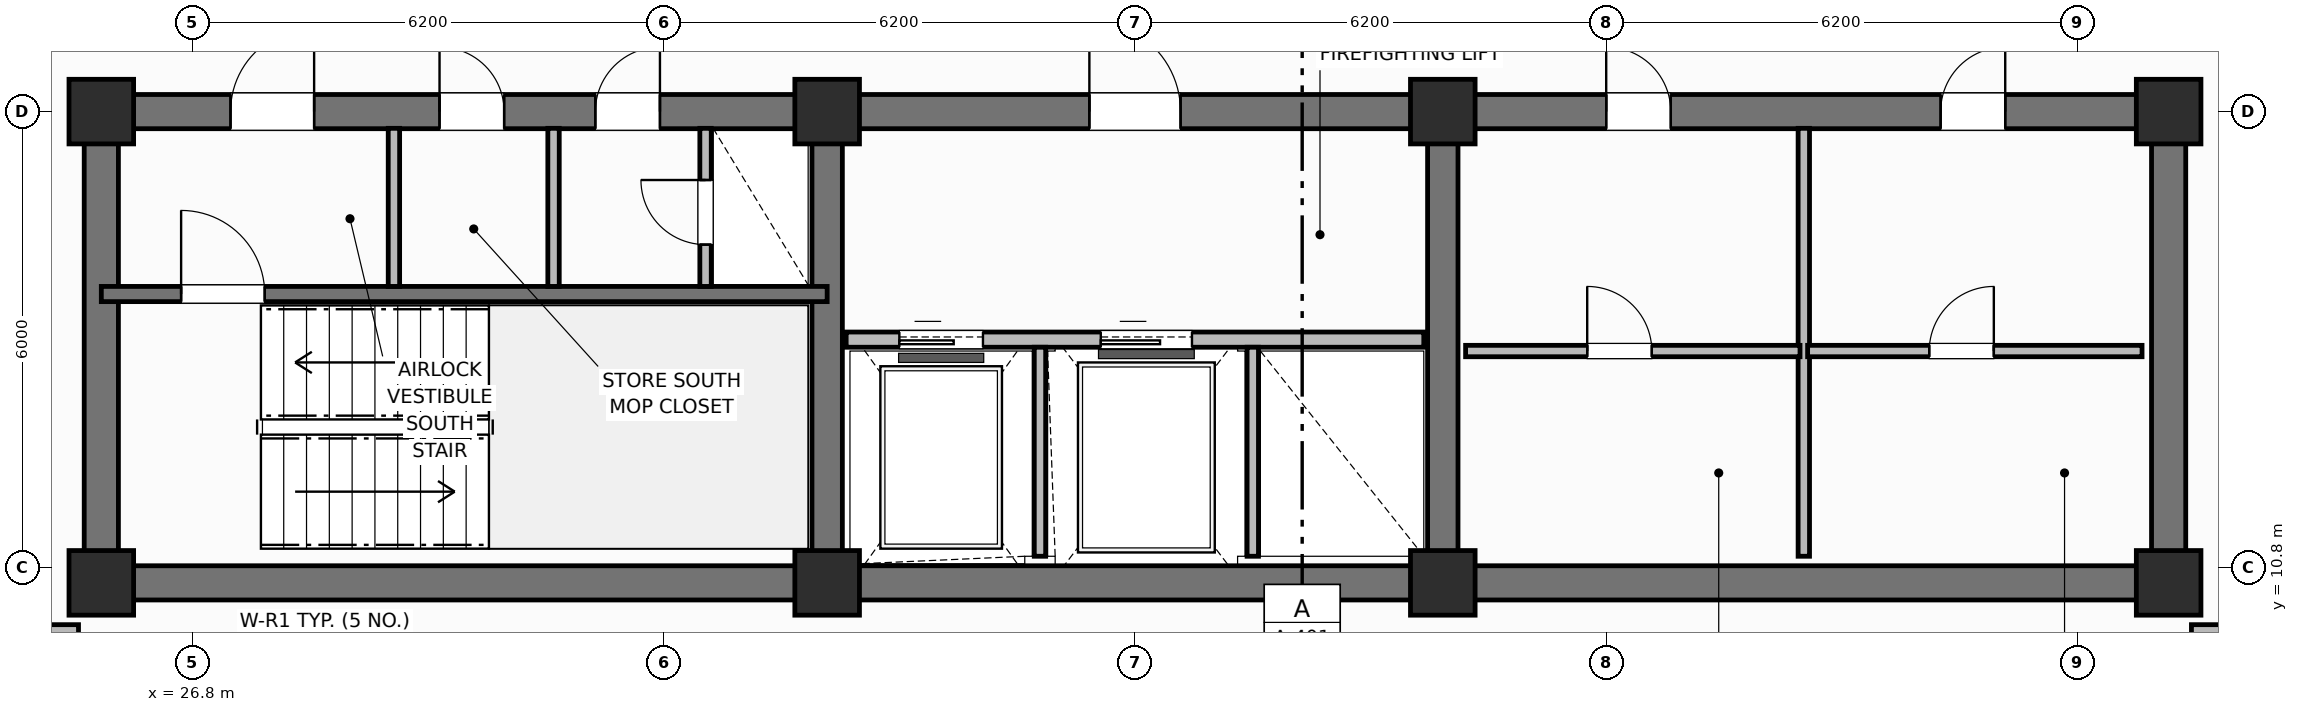
"""IFC4 building model, lengths in metres.
Left out: names, types, materials, properties, quantities, classifications, styles, units other than length and angle.
Written with IfcOpenShell. Run it as: python <this file> out.ifc"""

import sys

from ifc_helpers import new_model, si_unit, direction, frame, frame_2d, origin, origin_2d, place, context, subcontext, project, spatial, rectangle, extrude, element, fill, save


model = new_model("IFC4")
c1 = context("Model", 3, precision=1e-05, world=origin(), true_north=direction((0.0, 1.0)))
c2 = subcontext(c1, "Body", "Model", "MODEL_VIEW")
j1 = project(units=[si_unit("LENGTHUNIT", "METRE"), si_unit("PLANEANGLEUNIT", "RADIAN")], contexts=[c1])
p1 = place(None, origin())
s1 = spatial("IfcSite", under=j1, at=p1, CompositionType="ELEMENT")
p2 = place(p1, origin())
s2 = spatial("IfcBuilding", under=s1, at=p2, CompositionType="ELEMENT")
p3 = place(p2, frame((0.0, 0.0, 240.6)))
s3 = spatial("IfcBuildingStorey", under=s2, at=p3, CompositionType="ELEMENT", Elevation=240.6)
p4 = place(p3, frame((52.8, 10.6, 0.0), z_axis=(0.0, 0.0, 1.0), x_axis=(-1.0, 0.0, 0.0)))
e1 = element("IfcWall", 1, at=p4, inside=s3, PredefinedType="SHEAR", context=c2, shape_type="SweptSolid", body=[
    extrude(rectangle(XDim=27.2, YDim=0.45, at=frame_2d((13.6, 0.0))), origin(), (0.0, 0.0, 1.0), 3.7),
])
for number, where, z_axis, x_axis in (
    (2, (25.6, 10.825, 0.0), (0.0, 0.0, 1.0), (0.0, 1.0, 0.0)),
    (3, (52.8, 10.825, 0.0), (0.0, 0.0, 1.0), (0.0, 1.0, 0.0)),
):
    element("IfcWall", number, at=place(p3, frame(where, z_axis=z_axis, x_axis=x_axis)), inside=s3, PredefinedType="SHEAR", context=c2, shape_type="SweptSolid", body=[
        extrude(rectangle(XDim=5.75, YDim=0.45, at=frame_2d((2.875, 0.0))), origin(), (0.0, 0.0, 1.0), 3.7),
    ])
p5 = place(p3, frame((25.6, 16.8, 0.0), z_axis=(0.0, 0.0, 1.0), x_axis=(1.0, 0.0, 0.0)))
e4 = element("IfcWall", 4, at=p5, inside=s3, PredefinedType="SHEAR", context=c2, shape_type="SweptSolid", body=[
    extrude(rectangle(XDim=27.2, YDim=0.45, at=frame_2d((13.6, 0.0))), origin(), (0.0, 0.0, 1.0), 3.7),
])
p6 = place(p5, frame((1.7, 0.0, 0.0)))
e5 = element("IfcOpeningElement", 5, at=p6, cuts=e4, PredefinedType="OPENING", context=c2, shape_type="SweptSolid", body=[
    extrude(rectangle(XDim=1.1, YDim=2.15, at=frame_2d((0.55, 1.075))), frame((0.0, 0.235, 0.0), z_axis=(0.0, -1.0, 0.0), x_axis=(1.0, 0.0, 0.0)), (0.0, 0.0, 1.0), 0.47),
])
p7 = place(p5, frame((4.45, 0.0, 0.0)))
e6 = element("IfcOpeningElement", 6, at=p7, cuts=e4, PredefinedType="OPENING", context=c2, shape_type="SweptSolid", body=[
    extrude(rectangle(XDim=0.85, YDim=2.1, at=frame_2d((0.425, 1.05))), frame((0.0, 0.235, 0.0), z_axis=(0.0, -1.0, 0.0), x_axis=(1.0, 0.0, 0.0)), (0.0, 0.0, 1.0), 0.47),
])
p8 = place(p5, frame((6.5, 0.0, 0.0)))
e7 = element("IfcOpeningElement", 7, at=p8, cuts=e4, PredefinedType="OPENING", context=c2, shape_type="SweptSolid", body=[
    extrude(rectangle(XDim=0.85, YDim=2.1, at=frame_2d((0.425, 1.05))), frame((0.0, 0.235, 0.0), z_axis=(0.0, -1.0, 0.0), x_axis=(1.0, 0.0, 0.0)), (0.0, 0.0, 1.0), 0.47),
])
p9 = place(p5, frame((13.0, 0.0, 0.0)))
e8 = element("IfcOpeningElement", 8, at=p9, cuts=e4, PredefinedType="OPENING", context=c2, shape_type="SweptSolid", body=[
    extrude(rectangle(XDim=1.2, YDim=2.15, at=frame_2d((0.6, 1.075))), frame((0.0, 0.235, 0.0), z_axis=(0.0, -1.0, 0.0), x_axis=(1.0, 0.0, 0.0)), (0.0, 0.0, 1.0), 0.47),
])
p10 = place(p5, frame((19.8, 0.0, 0.0)))
e9 = element("IfcOpeningElement", 9, at=p10, cuts=e4, PredefinedType="OPENING", context=c2, shape_type="SweptSolid", body=[
    extrude(rectangle(XDim=0.85, YDim=2.1, at=frame_2d((0.425, 1.05))), frame((0.0, 0.235, 0.0), z_axis=(0.0, -1.0, 0.0), x_axis=(1.0, 0.0, 0.0)), (0.0, 0.0, 1.0), 0.47),
])
p11 = place(p5, frame((24.2, 0.0, 0.0)))
e10 = element("IfcOpeningElement", 10, at=p11, cuts=e4, PredefinedType="OPENING", context=c2, shape_type="SweptSolid", body=[
    extrude(rectangle(XDim=0.85, YDim=2.1, at=frame_2d((0.425, 1.05))), frame((0.0, 0.235, 0.0), z_axis=(0.0, -1.0, 0.0), x_axis=(1.0, 0.0, 0.0)), (0.0, 0.0, 1.0), 0.47),
])
for number, where, z_axis, x_axis in (
    (11, (35.15, 10.825, 0.0), (0.0, 0.0, 1.0), (0.0, 1.0, 0.0)),
    (12, (43.25, 10.825, 0.0), (0.0, 0.0, 1.0), (0.0, 1.0, 0.0)),
):
    element("IfcWall", number, at=place(p3, frame(where, z_axis=z_axis, x_axis=x_axis)), inside=s3, PredefinedType="SHEAR", context=c2, shape_type="SweptSolid", body=[
        extrude(rectangle(XDim=5.75, YDim=0.4, at=frame_2d((2.875, 0.0))), origin(), (0.0, 0.0, 1.0), 3.7),
    ])
for number, where, z_axis, x_axis in (
    (13, (25.6, 10.6, 0.0), (0.0, 0.0, 1.0), (1.0, 0.0, 0.0)),
    (14, (25.6, 16.8, 0.0), (0.0, 0.0, 1.0), (1.0, 0.0, 0.0)),
    (15, (35.15, 10.6, 0.0), (0.0, 0.0, 1.0), (1.0, 0.0, 0.0)),
    (16, (35.15, 16.8, 0.0), (0.0, 0.0, 1.0), (1.0, 0.0, 0.0)),
    (17, (43.25, 10.6, 0.0), (0.0, 0.0, 1.0), (1.0, 0.0, 0.0)),
    (18, (43.25, 16.8, 0.0), (0.0, 0.0, 1.0), (1.0, 0.0, 0.0)),
    (19, (52.8, 10.6, 0.0), (0.0, 0.0, 1.0), (1.0, 0.0, 0.0)),
    (20, (52.8, 16.8, 0.0), (0.0, 0.0, 1.0), (1.0, 0.0, 0.0)),
):
    element("IfcColumn", number, at=place(p3, frame(where, z_axis=z_axis, x_axis=x_axis)), inside=s3, PredefinedType="COLUMN", context=c2, shape_type="SweptSolid", body=[
        extrude(rectangle(XDim=0.85, YDim=0.85, at=origin_2d()), origin(), (0.0, 0.0, 1.0), 3.7),
    ])
p12 = place(p3, frame((25.6, 14.4, 0.0), z_axis=(0.0, 0.0, 1.0), x_axis=(1.0, 0.0, 0.0)))
e21 = element("IfcWall", 21, at=p12, inside=s3, PredefinedType="SHEAR", context=c2, shape_type="SweptSolid", body=[
    extrude(rectangle(XDim=9.55, YDim=0.2, at=frame_2d((4.775, 0.0))), origin(), (0.0, 0.0, 1.0), 3.7),
])
p13 = place(p12, frame((1.05, 0.0, 0.0)))
e22 = element("IfcOpeningElement", 22, at=p13, cuts=e21, PredefinedType="OPENING", context=c2, shape_type="SweptSolid", body=[
    extrude(rectangle(XDim=1.1, YDim=2.15, at=frame_2d((0.55, 1.075))), frame((0.0, 0.11, 0.0), z_axis=(0.0, -1.0, 0.0), x_axis=(1.0, 0.0, 0.0)), (0.0, 0.0, 1.0), 0.22),
])
for number, where, z_axis, x_axis in (
    (23, (29.45, 14.5, 0.0), (0.0, 0.0, 1.0), (0.0, 1.0, 0.0)),
    (24, (31.55, 14.5, 0.0), (0.0, 0.0, 1.0), (0.0, 1.0, 0.0)),
):
    element("IfcWall", number, at=place(p3, frame(where, z_axis=z_axis, x_axis=x_axis)), inside=s3, PredefinedType="PARTITIONING", context=c2, shape_type="SweptSolid", body=[
        extrude(rectangle(XDim=2.08, YDim=0.15, at=frame_2d((1.04, 0.0))), origin(), (0.0, 0.0, 1.0), 2.56),
    ])
p14 = place(p3, frame((33.55, 14.5, 0.0), z_axis=(0.0, 0.0, 1.0), x_axis=(0.0, 1.0, 0.0)))
e25 = element("IfcWall", 25, at=p14, inside=s3, PredefinedType="PARTITIONING", context=c2, shape_type="SweptSolid", body=[
    extrude(rectangle(XDim=2.08, YDim=0.15, at=frame_2d((1.04, 0.0))), origin(), (0.0, 0.0, 1.0), 2.56),
])
p15 = place(p14, frame((0.55, 0.0, 0.0)))
e26 = element("IfcOpeningElement", 26, at=p15, cuts=e25, PredefinedType="OPENING", context=c2, shape_type="SweptSolid", body=[
    extrude(rectangle(XDim=0.85, YDim=2.05, at=frame_2d((0.425, 1.025))), frame((0.0, 0.085, 0.0), z_axis=(0.0, -1.0, 0.0), x_axis=(1.0, 0.0, 0.0)), (0.0, 0.0, 1.0), 0.17),
])
p16 = place(p3, frame((35.4, 13.8, 0.0), z_axis=(0.0, 0.0, 1.0), x_axis=(1.0, 0.0, 0.0)))
e27 = element("IfcWall", 27, at=p16, inside=s3, PredefinedType="PARTITIONING", context=c2, shape_type="SweptSolid", body=[
    extrude(rectangle(XDim=7.6, YDim=0.2, at=frame_2d((3.8, 0.0))), origin(), (0.0, 0.0, 1.0), 2.33),
])
p17 = place(p16, frame((0.7, 0.0, 0.0)))
e28 = element("IfcOpeningElement", 28, at=p17, cuts=e27, PredefinedType="OPENING", context=c2, shape_type="SweptSolid", body=[
    extrude(rectangle(XDim=1.1, YDim=2.15, at=frame_2d((0.55, 1.075))), frame((0.0, 0.11, 0.0), z_axis=(0.0, -1.0, 0.0), x_axis=(1.0, 0.0, 0.0)), (0.0, 0.0, 1.0), 0.22),
])
p18 = place(p16, frame((3.35, 0.0, 0.0)))
e29 = element("IfcOpeningElement", 29, at=p18, cuts=e27, PredefinedType="OPENING", context=c2, shape_type="SweptSolid", body=[
    extrude(rectangle(XDim=1.2, YDim=2.15, at=frame_2d((0.6, 1.075))), frame((0.0, 0.11, 0.0), z_axis=(0.0, -1.0, 0.0), x_axis=(1.0, 0.0, 0.0)), (0.0, 0.0, 1.0), 0.22),
])
for number, where, z_axis, x_axis in (
    (30, (37.95, 10.95, 0.0), (0.0, 0.0, 1.0), (0.0, 1.0, 0.0)),
    (31, (40.75, 10.95, 0.0), (0.0, 0.0, 1.0), (0.0, 1.0, 0.0)),
):
    element("IfcWall", number, at=place(p3, frame(where, z_axis=z_axis, x_axis=x_axis)), inside=s3, PredefinedType="PARTITIONING", context=c2, shape_type="SweptSolid", body=[
        extrude(rectangle(XDim=2.75, YDim=0.15, at=frame_2d((1.375, 0.0))), origin(), (0.0, 0.0, 1.0), 2.56),
    ])
p19 = place(p3, frame((48.0, 10.95, 0.0), z_axis=(0.0, 0.0, 1.0), x_axis=(0.0, 1.0, 0.0)))
e32 = element("IfcWall", 32, at=p19, inside=s3, PredefinedType="PARTITIONING", context=c2, shape_type="SweptSolid", body=[
    extrude(rectangle(XDim=5.63, YDim=0.15, at=frame_2d((2.815, 0.0))), origin(), (0.0, 0.0, 1.0), 2.56),
])
p20 = place(p3, frame((43.55, 13.65, 0.0), z_axis=(0.0, 0.0, 1.0), x_axis=(1.0, 0.0, 0.0)))
e33 = element("IfcWall", 33, at=p20, inside=s3, PredefinedType="PARTITIONING", context=c2, shape_type="SweptSolid", body=[
    extrude(rectangle(XDim=4.4, YDim=0.15, at=frame_2d((2.2, 0.0))), origin(), (0.0, 0.0, 1.0), 2.56),
])
p21 = place(p20, frame((1.6, 0.0, 0.0)))
e34 = element("IfcOpeningElement", 34, at=p21, cuts=e33, PredefinedType="OPENING", context=c2, shape_type="SweptSolid", body=[
    extrude(rectangle(XDim=0.85, YDim=2.1, at=frame_2d((0.425, 1.05))), frame((0.0, 0.085, 0.0), z_axis=(0.0, -1.0, 0.0), x_axis=(1.0, 0.0, 0.0)), (0.0, 0.0, 1.0), 0.17),
])
p22 = place(p3, frame((48.05, 13.65, 0.0), z_axis=(0.0, 0.0, 1.0), x_axis=(1.0, 0.0, 0.0)))
e35 = element("IfcWall", 35, at=p22, inside=s3, PredefinedType="PARTITIONING", context=c2, shape_type="SweptSolid", body=[
    extrude(rectangle(XDim=4.4, YDim=0.15, at=frame_2d((2.2, 0.0))), origin(), (0.0, 0.0, 1.0), 2.56),
])
p23 = place(p22, frame((1.6, 0.0, 0.0)))
e36 = element("IfcOpeningElement", 36, at=p23, cuts=e35, PredefinedType="OPENING", context=c2, shape_type="SweptSolid", body=[
    extrude(rectangle(XDim=0.85, YDim=2.1, at=frame_2d((0.425, 1.05))), frame((0.0, 0.085, 0.0), z_axis=(0.0, -1.0, 0.0), x_axis=(1.0, 0.0, 0.0)), (0.0, 0.0, 1.0), 0.17),
])
p24 = place(p3, frame((21.546, 9.95, 0.0), z_axis=(0.0, 0.0, 1.0), x_axis=(1.0, 0.0, 0.0)))
e37 = element("IfcWall", 37, at=p24, inside=s3, PredefinedType="PARTITIONING", context=c2, shape_type="SweptSolid", body=[
    extrude(rectangle(XDim=3.754, YDim=0.2, at=frame_2d((1.877, 0.0))), origin(), (0.0, 0.0, 1.0), 2.56),
])
p25 = place(p3, frame((53.1, 9.95, 0.0), z_axis=(0.0, 0.0, 1.0), x_axis=(1.0, 0.0, 0.0)))
e38 = element("IfcWall", 38, at=p25, inside=s3, PredefinedType="PARTITIONING", context=c2, shape_type="SweptSolid", body=[
    extrude(rectangle(XDim=3.754, YDim=0.2, at=frame_2d((1.877, 0.0))), origin(), (0.0, 0.0, 1.0), 2.56),
])
p26 = place(p13, origin())
e39 = element("IfcDoor", 39, at=p26, inside=s3, OperationType="SINGLE_SWING_LEFT", PredefinedType="DOOR", context=c2, shape_type="SweptSolid", body=[
    extrude(rectangle(XDim=1.1, YDim=2.15, at=frame_2d((0.55, 1.075))), frame((0.0, 0.025, 0.0), z_axis=(0.0, -1.0, 0.0), x_axis=(1.0, 0.0, 0.0)), (0.0, 0.0, 1.0), 0.05),
])
fill(e22, e39)
p27 = place(p15, origin())
e40 = element("IfcDoor", 40, at=p27, inside=s3, OperationType="SINGLE_SWING_RIGHT", PredefinedType="TRAPDOOR", context=c2, shape_type="SweptSolid", body=[
    extrude(rectangle(XDim=0.85, YDim=2.05, at=frame_2d((0.425, 1.025))), frame((0.0, 0.025, 0.0), z_axis=(0.0, -1.0, 0.0), x_axis=(1.0, 0.0, 0.0)), (0.0, 0.0, 1.0), 0.05),
])
fill(e26, e40)
p28 = place(p17, origin())
e41 = element("IfcDoor", 41, at=p28, inside=s3, OperationType="SLIDING_TO_LEFT", PredefinedType="DOOR", context=c2, shape_type="SweptSolid", body=[
    extrude(rectangle(XDim=1.1, YDim=2.15, at=frame_2d((0.55, 1.075))), frame((0.0, 0.025, 0.0), z_axis=(0.0, -1.0, 0.0), x_axis=(1.0, 0.0, 0.0)), (0.0, 0.0, 1.0), 0.05),
])
fill(e28, e41)
p29 = place(p18, origin())
e42 = element("IfcDoor", 42, at=p29, inside=s3, OperationType="SLIDING_TO_LEFT", PredefinedType="DOOR", context=c2, shape_type="SweptSolid", body=[
    extrude(rectangle(XDim=1.2, YDim=2.15, at=frame_2d((0.6, 1.075))), frame((0.0, 0.025, 0.0), z_axis=(0.0, -1.0, 0.0), x_axis=(1.0, 0.0, 0.0)), (0.0, 0.0, 1.0), 0.05),
])
fill(e29, e42)
p30 = place(p21, origin())
e43 = element("IfcDoor", 43, at=p30, inside=s3, OperationType="SINGLE_SWING_LEFT", PredefinedType="DOOR", context=c2, shape_type="SweptSolid", body=[
    extrude(rectangle(XDim=0.85, YDim=2.1, at=frame_2d((0.425, 1.05))), frame((0.0, 0.025, 0.0), z_axis=(0.0, -1.0, 0.0), x_axis=(1.0, 0.0, 0.0)), (0.0, 0.0, 1.0), 0.05),
])
fill(e34, e43)
p31 = place(p23, origin())
e44 = element("IfcDoor", 44, at=p31, inside=s3, OperationType="SINGLE_SWING_RIGHT", PredefinedType="DOOR", context=c2, shape_type="SweptSolid", body=[
    extrude(rectangle(XDim=0.85, YDim=2.1, at=frame_2d((0.425, 1.05))), frame((0.0, 0.025, 0.0), z_axis=(0.0, -1.0, 0.0), x_axis=(1.0, 0.0, 0.0)), (0.0, 0.0, 1.0), 0.05),
])
fill(e36, e44)
p32 = place(p6, origin())
e45 = element("IfcDoor", 45, at=p32, inside=s3, OperationType="SINGLE_SWING_RIGHT", PredefinedType="DOOR", context=c2, shape_type="SweptSolid", body=[
    extrude(rectangle(XDim=1.1, YDim=2.15, at=frame_2d((0.55, 1.075))), frame((0.0, 0.025, 0.0), z_axis=(0.0, -1.0, 0.0), x_axis=(1.0, 0.0, 0.0)), (0.0, 0.0, 1.0), 0.05),
])
fill(e5, e45)
p33 = place(p7, origin())
e46 = element("IfcDoor", 46, at=p33, inside=s3, OperationType="SINGLE_SWING_LEFT", PredefinedType="DOOR", context=c2, shape_type="SweptSolid", body=[
    extrude(rectangle(XDim=0.85, YDim=2.1, at=frame_2d((0.425, 1.05))), frame((0.0, 0.025, 0.0), z_axis=(0.0, -1.0, 0.0), x_axis=(1.0, 0.0, 0.0)), (0.0, 0.0, 1.0), 0.05),
])
fill(e6, e46)
p34 = place(p8, origin())
e47 = element("IfcDoor", 47, at=p34, inside=s3, OperationType="SINGLE_SWING_RIGHT", PredefinedType="DOOR", context=c2, shape_type="SweptSolid", body=[
    extrude(rectangle(XDim=0.85, YDim=2.1, at=frame_2d((0.425, 1.05))), frame((0.0, 0.025, 0.0), z_axis=(0.0, -1.0, 0.0), x_axis=(1.0, 0.0, 0.0)), (0.0, 0.0, 1.0), 0.05),
])
fill(e7, e47)
p35 = place(p9, origin())
e48 = element("IfcDoor", 48, at=p35, inside=s3, OperationType="SINGLE_SWING_LEFT", PredefinedType="DOOR", context=c2, shape_type="SweptSolid", body=[
    extrude(rectangle(XDim=1.2, YDim=2.15, at=frame_2d((0.6, 1.075))), frame((0.0, 0.025, 0.0), z_axis=(0.0, -1.0, 0.0), x_axis=(1.0, 0.0, 0.0)), (0.0, 0.0, 1.0), 0.05),
])
fill(e8, e48)
p36 = place(p10, origin())
e49 = element("IfcDoor", 49, at=p36, inside=s3, OperationType="SINGLE_SWING_LEFT", PredefinedType="DOOR", context=c2, shape_type="SweptSolid", body=[
    extrude(rectangle(XDim=0.85, YDim=2.1, at=frame_2d((0.425, 1.05))), frame((0.0, 0.025, 0.0), z_axis=(0.0, -1.0, 0.0), x_axis=(1.0, 0.0, 0.0)), (0.0, 0.0, 1.0), 0.05),
])
fill(e9, e49)
p37 = place(p11, origin())
e50 = element("IfcDoor", 50, at=p37, inside=s3, OperationType="SINGLE_SWING_RIGHT", PredefinedType="DOOR", context=c2, shape_type="SweptSolid", body=[
    extrude(rectangle(XDim=0.85, YDim=2.1, at=frame_2d((0.425, 1.05))), frame((0.0, 0.025, 0.0), z_axis=(0.0, -1.0, 0.0), x_axis=(1.0, 0.0, 0.0)), (0.0, 0.0, 1.0), 0.05),
])
fill(e10, e50)
save(model, sys.argv[1])
